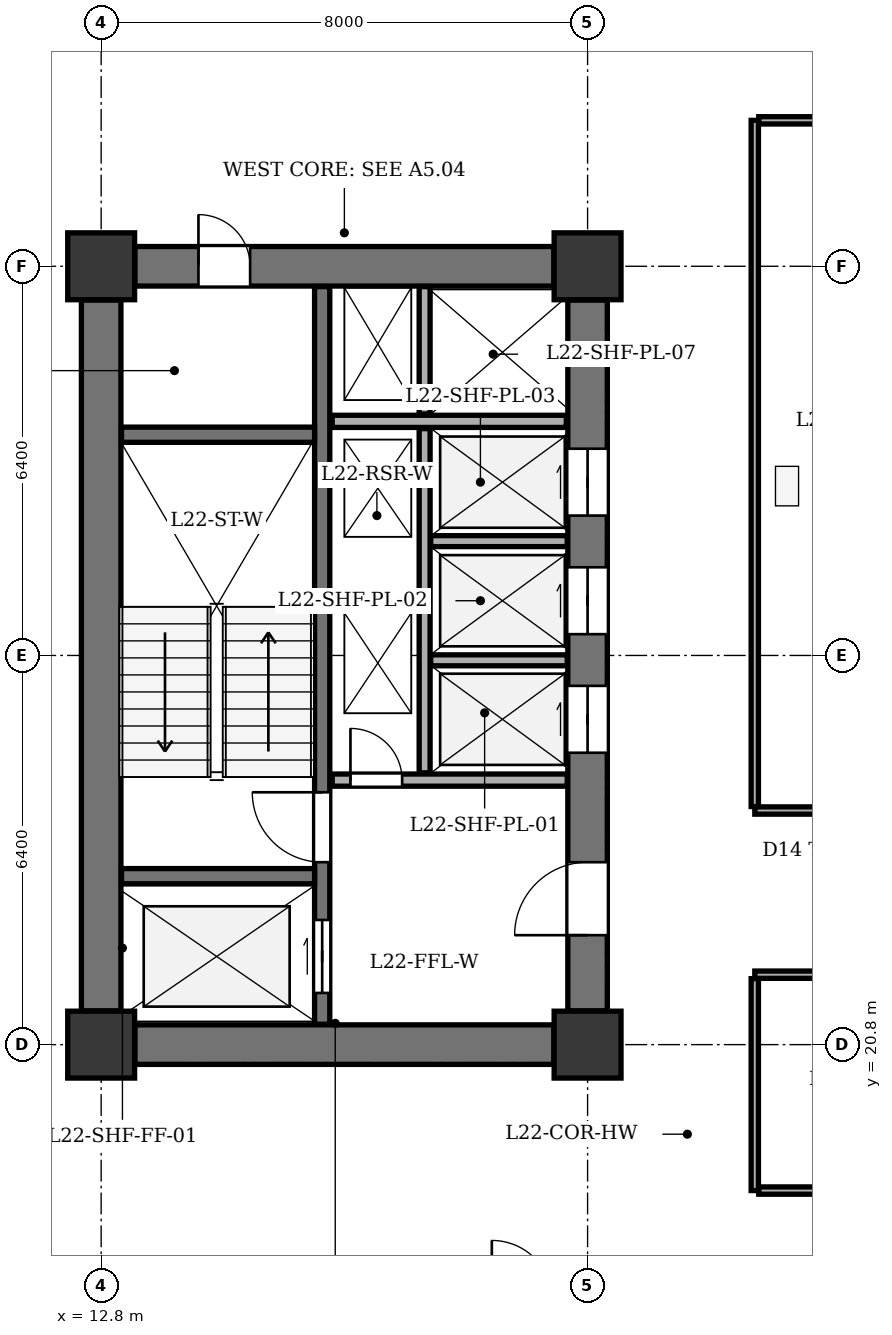
"""IFC4 building model, lengths in metres.
Left out: names, types, materials, properties, quantities, classifications, styles, units other than length and angle.
Written with IfcOpenShell. Run it as: python <this file> out.ifc"""

import sys

from ifc_helpers import new_model, si_unit, direction, frame, frame_2d, origin, origin_2d, place, context, subcontext, project, spatial, rectangle, extrude, element, fill, save


model = new_model("IFC4")
c1 = context("Model", 3, precision=1e-05, world=origin(), true_north=direction((0.0, 1.0)))
c2 = subcontext(c1, "Body", "Model", "MODEL_VIEW")
j1 = project(units=[si_unit("LENGTHUNIT", "METRE"), si_unit("PLANEANGLEUNIT", "RADIAN")], contexts=[c1])
p1 = place(None, origin())
s1 = spatial("IfcSite", under=j1, at=p1, CompositionType="ELEMENT")
p2 = place(p1, origin())
s2 = spatial("IfcBuilding", under=s1, at=p2, CompositionType="ELEMENT")
p3 = place(p2, frame((0.0, 0.0, 90.6)))
s3 = spatial("IfcBuildingStorey", under=s2, at=p3, CompositionType="ELEMENT", Elevation=90.6)
for number, where, z_axis, x_axis in (
    (1, (12.8, 20.8, 0.0), (0.0, 0.0, 1.0), (1.0, 0.0, 0.0)),
    (2, (20.8, 20.8, 0.0), (0.0, 0.0, 1.0), (1.0, 0.0, 0.0)),
    (3, (12.8, 33.6, 0.0), (0.0, 0.0, 1.0), (1.0, 0.0, 0.0)),
    (4, (20.8, 33.6, 0.0), (0.0, 0.0, 1.0), (1.0, 0.0, 0.0)),
):
    element("IfcColumn", number, at=place(p3, frame(where, z_axis=z_axis, x_axis=x_axis)), inside=s3, PredefinedType="COLUMN", context=c2, shape_type="SweptSolid", body=[
        extrude(rectangle(XDim=1.1, YDim=1.1, at=origin_2d()), origin(), (0.0, 0.0, 1.0), 3.9),
    ])
p4 = place(p3, frame((12.8, 21.355, 0.0), z_axis=(0.0, 0.0, 1.0), x_axis=(0.0, 1.0, 0.0)))
e5 = element("IfcWall", 5, at=p4, inside=s3, PredefinedType="SHEAR", context=c2, shape_type="SweptSolid", body=[
    extrude(rectangle(XDim=11.69, YDim=0.65, at=frame_2d((5.845, 0.0))), origin(), (0.0, 0.0, 1.0), 3.45),
])
p5 = place(p3, frame((13.355, 20.8, 0.0), z_axis=(0.0, 0.0, 1.0), x_axis=(1.0, 0.0, 0.0)))
e6 = element("IfcWall", 6, at=p5, inside=s3, PredefinedType="SHEAR", context=c2, shape_type="SweptSolid", body=[
    extrude(rectangle(XDim=6.89, YDim=0.65, at=frame_2d((3.445, 0.0))), origin(), (0.0, 0.0, 1.0), 3.45),
])
p6 = place(p3, frame((13.355, 33.6, 0.0), z_axis=(0.0, 0.0, 1.0), x_axis=(1.0, 0.0, 0.0)))
e7 = element("IfcWall", 7, at=p6, inside=s3, PredefinedType="SHEAR", context=c2, shape_type="SweptSolid", body=[
    extrude(rectangle(XDim=6.89, YDim=0.65, at=frame_2d((3.445, 0.0))), origin(), (0.0, 0.0, 1.0), 3.45),
])
p7 = place(p6, frame((1.045, 0.0, 0.0)))
e8 = element("IfcOpeningElement", 8, at=p7, cuts=e7, PredefinedType="OPENING", context=c2, shape_type="SweptSolid", body=[
    extrude(rectangle(XDim=0.85, YDim=2.02, at=frame_2d((0.425, 1.01))), frame((0.0, 0.335, 0.0), z_axis=(0.0, -1.0, 0.0), x_axis=(1.0, 0.0, 0.0)), (0.0, 0.0, 1.0), 0.67),
])
p8 = place(p3, frame((20.8, 21.355, 0.0), z_axis=(0.0, 0.0, 1.0), x_axis=(0.0, 1.0, 0.0)))
e9 = element("IfcWall", 9, at=p8, inside=s3, PredefinedType="SHEAR", context=c2, shape_type="SweptSolid", body=[
    extrude(rectangle(XDim=11.69, YDim=0.65, at=frame_2d((5.845, 0.0))), origin(), (0.0, 0.0, 1.0), 3.45),
])
p9 = place(p8, frame((1.245, 0.0, 0.0)))
e10 = element("IfcOpeningElement", 10, at=p9, cuts=e9, PredefinedType="OPENING", context=c2, shape_type="SweptSolid", body=[
    extrude(rectangle(XDim=1.2, YDim=2.15, at=frame_2d((0.6, 1.075))), frame((0.0, 0.335, 0.0), z_axis=(0.0, -1.0, 0.0), x_axis=(1.0, 0.0, 0.0)), (0.0, 0.0, 1.0), 0.67),
])
p10 = place(p8, frame((4.245, 0.0, 0.0)))
e11 = element("IfcOpeningElement", 11, at=p10, cuts=e9, PredefinedType="OPENING", context=c2, shape_type="SweptSolid", body=[
    extrude(rectangle(XDim=1.1, YDim=2.1, at=frame_2d((0.55, 1.05))), frame((0.0, 0.335, 0.0), z_axis=(0.0, -1.0, 0.0), x_axis=(1.0, 0.0, 0.0)), (0.0, 0.0, 1.0), 0.67),
])
p11 = place(p8, frame((6.195, 0.0, 0.0)))
e12 = element("IfcOpeningElement", 12, at=p11, cuts=e9, PredefinedType="OPENING", context=c2, shape_type="SweptSolid", body=[
    extrude(rectangle(XDim=1.1, YDim=2.1, at=frame_2d((0.55, 1.05))), frame((0.0, 0.335, 0.0), z_axis=(0.0, -1.0, 0.0), x_axis=(1.0, 0.0, 0.0)), (0.0, 0.0, 1.0), 0.67),
])
p12 = place(p8, frame((8.145, 0.0, 0.0)))
e13 = element("IfcOpeningElement", 13, at=p12, cuts=e9, PredefinedType="OPENING", context=c2, shape_type="SweptSolid", body=[
    extrude(rectangle(XDim=1.1, YDim=2.1, at=frame_2d((0.55, 1.05))), frame((0.0, 0.335, 0.0), z_axis=(0.0, -1.0, 0.0), x_axis=(1.0, 0.0, 0.0)), (0.0, 0.0, 1.0), 0.67),
])
p13 = place(p3, frame((16.435, 21.135, 0.0), z_axis=(0.0, 0.0, 1.0), x_axis=(0.0, 1.0, 0.0)))
e14 = element("IfcWall", 14, at=p13, inside=s3, PredefinedType="SHEAR", context=c2, shape_type="SweptSolid", body=[
    extrude(rectangle(XDim=12.13, YDim=0.25, at=frame_2d((6.065, 0.0))), origin(), (0.0, 0.0, 1.0), 3.45),
])
p14 = place(p13, frame((0.515, 0.0, 0.0)))
e15 = element("IfcOpeningElement", 15, at=p14, cuts=e14, PredefinedType="OPENING", context=c2, shape_type="SweptSolid", body=[
    extrude(rectangle(XDim=1.2, YDim=2.15, at=frame_2d((0.6, 1.075))), frame((0.0, 0.135, 0.0), z_axis=(0.0, -1.0, 0.0), x_axis=(1.0, 0.0, 0.0)), (0.0, 0.0, 1.0), 0.27),
])
p15 = place(p13, frame((2.665, 0.0, 0.0)))
e16 = element("IfcOpeningElement", 16, at=p15, cuts=e14, PredefinedType="OPENING", context=c2, shape_type="SweptSolid", body=[
    extrude(rectangle(XDim=1.15, YDim=2.15, at=frame_2d((0.575, 1.075))), frame((0.0, 0.135, 0.0), z_axis=(0.0, -1.0, 0.0), x_axis=(1.0, 0.0, 0.0)), (0.0, 0.0, 1.0), 0.27),
])
for number, where, z_axis, x_axis in (
    (17, (13.135, 23.57, 0.0), (0.0, 0.0, 1.0), (1.0, 0.0, 0.0)),
    (18, (13.135, 30.83, 0.0), (0.0, 0.0, 1.0), (1.0, 0.0, 0.0)),
):
    element("IfcWall", number, at=place(p3, frame(where, z_axis=z_axis, x_axis=x_axis)), inside=s3, PredefinedType="SHEAR", context=c2, shape_type="SweptSolid", body=[
        extrude(rectangle(XDim=3.175, YDim=0.25, at=frame_2d((1.587, 0.0))), origin(), (0.0, 0.0, 1.0), 3.45),
    ])
p16 = place(p3, frame((16.6, 25.15, 0.0), z_axis=(0.0, 0.0, 1.0), x_axis=(1.0, 0.0, 0.0)))
e19 = element("IfcWall", 19, at=p16, inside=s3, PredefinedType="SOLIDWALL", context=c2, shape_type="SweptSolid", body=[
    extrude(rectangle(XDim=3.865, YDim=0.2, at=frame_2d((1.933, 0.0))), origin(), (0.0, 0.0, 1.0), 3.45),
])
p17 = place(p16, frame((0.3, 0.0, 0.0)))
e20 = element("IfcOpeningElement", 20, at=p17, cuts=e19, PredefinedType="OPENING", context=c2, shape_type="SweptSolid", body=[
    extrude(rectangle(XDim=0.85, YDim=2.02, at=frame_2d((0.425, 1.01))), frame((0.0, 0.11, 0.0), z_axis=(0.0, -1.0, 0.0), x_axis=(1.0, 0.0, 0.0)), (0.0, 0.0, 1.0), 0.22),
])
p18 = place(p3, frame((16.6, 31.05, 0.0), z_axis=(0.0, 0.0, 1.0), x_axis=(1.0, 0.0, 0.0)))
e21 = element("IfcWall", 21, at=p18, inside=s3, PredefinedType="SOLIDWALL", context=c2, shape_type="SweptSolid", body=[
    extrude(rectangle(XDim=3.85, YDim=0.2, at=frame_2d((1.925, 0.0))), origin(), (0.0, 0.0, 1.0), 3.45),
])
p19 = place(p3, frame((18.12, 25.27, 0.0), z_axis=(0.0, 0.0, 1.0), x_axis=(0.0, 1.0, 0.0)))
e22 = element("IfcWall", 22, at=p19, inside=s3, PredefinedType="PARTITIONING", context=c2, shape_type="SweptSolid", body=[
    extrude(rectangle(XDim=5.66, YDim=0.18, at=frame_2d((2.83, 0.0))), origin(), (0.0, 0.0, 1.0), 3.45),
])
p20 = place(p3, frame((18.12, 31.17, 0.0), z_axis=(0.0, 0.0, 1.0), x_axis=(0.0, 1.0, 0.0)))
e23 = element("IfcWall", 23, at=p20, inside=s3, PredefinedType="PARTITIONING", context=c2, shape_type="SweptSolid", body=[
    extrude(rectangle(XDim=2.095, YDim=0.18, at=frame_2d((1.047, 0.0))), origin(), (0.0, 0.0, 1.0), 3.45),
])
for number, where, z_axis, x_axis in (
    (24, (18.22, 27.12, 0.0), (0.0, 0.0, 1.0), (1.0, 0.0, 0.0)),
    (25, (18.22, 29.08, 0.0), (0.0, 0.0, 1.0), (1.0, 0.0, 0.0)),
):
    element("IfcWall", number, at=place(p3, frame(where, z_axis=z_axis, x_axis=x_axis)), inside=s3, PredefinedType="PARTITIONING", context=c2, shape_type="SweptSolid", body=[
        extrude(rectangle(XDim=2.245, YDim=0.18, at=frame_2d((1.123, 0.0))), origin(), (0.0, 0.0, 1.0), 3.45),
    ])
p21 = place(p3, frame((23.55, 24.65, 0.0), z_axis=(0.0, 0.0, 1.0), x_axis=(1.0, 0.0, 0.0)))
e26 = element("IfcWall", 26, at=p21, inside=s3, PredefinedType="PARTITIONING", context=c2, shape_type="SweptSolid", body=[
    extrude(rectangle(XDim=8.9, YDim=0.12, at=frame_2d((4.45, 0.0))), origin(), (0.0, 0.0, 1.0), 2.885),
])
p22 = place(p21, frame((1.0, 0.0, 0.0)))
e27 = element("IfcOpeningElement", 27, at=p22, cuts=e26, PredefinedType="OPENING", context=c2, shape_type="SweptSolid", body=[
    extrude(rectangle(XDim=0.95, YDim=2.1, at=frame_2d((0.475, 1.05))), frame((0.0, 0.07, 0.0), z_axis=(0.0, -1.0, 0.0), x_axis=(1.0, 0.0, 0.0)), (0.0, 0.0, 1.0), 0.14),
])
p23 = place(p21, frame((4.1, 0.0, 0.0)))
e28 = element("IfcOpeningElement", 28, at=p23, cuts=e26, PredefinedType="OPENING", context=c2, shape_type="SweptSolid", body=[
    extrude(rectangle(XDim=0.95, YDim=2.1, at=frame_2d((0.475, 1.05))), frame((0.0, 0.07, 0.0), z_axis=(0.0, -1.0, 0.0), x_axis=(1.0, 0.0, 0.0)), (0.0, 0.0, 1.0), 0.14),
])
p24 = place(p21, frame((7.0, 0.0, 0.0)))
e29 = element("IfcOpeningElement", 29, at=p24, cuts=e26, PredefinedType="OPENING", context=c2, shape_type="SweptSolid", body=[
    extrude(rectangle(XDim=1.0, YDim=2.1, at=frame_2d((0.5, 1.05))), frame((0.0, 0.07, 0.0), z_axis=(0.0, -1.0, 0.0), x_axis=(1.0, 0.0, 0.0)), (0.0, 0.0, 1.0), 0.14),
])
p25 = place(p3, frame((23.55, 24.715, 0.0), z_axis=(0.0, 0.0, 1.0), x_axis=(0.0, 1.0, 0.0)))
e30 = element("IfcWall", 30, at=p25, inside=s3, PredefinedType="PARTITIONING", context=c2, shape_type="SweptSolid", body=[
    extrude(rectangle(XDim=11.285, YDim=0.12, at=frame_2d((5.643, 0.0))), origin(), (0.0, 0.0, 1.0), 3.45),
])
p26 = place(p3, frame((23.615, 36.0, 0.0), z_axis=(0.0, 0.0, 1.0), x_axis=(1.0, 0.0, 0.0)))
e31 = element("IfcWall", 31, at=p26, inside=s3, PredefinedType="PARTITIONING", context=c2, shape_type="SweptSolid", body=[
    extrude(rectangle(XDim=8.77, YDim=0.12, at=frame_2d((4.385, 0.0))), origin(), (0.0, 0.0, 1.0), 3.45),
])
p27 = place(p3, frame((23.55, 21.95, 0.0), z_axis=(0.0, 0.0, 1.0), x_axis=(1.0, 0.0, 0.0)))
e32 = element("IfcWall", 32, at=p27, inside=s3, PredefinedType="PARTITIONING", context=c2, shape_type="SweptSolid", body=[
    extrude(rectangle(XDim=8.9, YDim=0.12, at=frame_2d((4.45, 0.0))), origin(), (0.0, 0.0, 1.0), 2.885),
])
p28 = place(p27, frame((3.6, 0.0, 0.0)))
e33 = element("IfcOpeningElement", 33, at=p28, cuts=e32, PredefinedType="OPENING", context=c2, shape_type="SweptSolid", body=[
    extrude(rectangle(XDim=1.1, YDim=2.15, at=frame_2d((0.55, 1.075))), frame((0.0, 0.07, 0.0), z_axis=(0.0, -1.0, 0.0), x_axis=(1.0, 0.0, 0.0)), (0.0, 0.0, 1.0), 0.14),
])
p29 = place(p3, frame((23.55, 18.4, 0.0), z_axis=(0.0, 0.0, 1.0), x_axis=(0.0, 1.0, 0.0)))
e34 = element("IfcWall", 34, at=p29, inside=s3, PredefinedType="PARTITIONING", context=c2, shape_type="SweptSolid", body=[
    extrude(rectangle(XDim=3.485, YDim=0.12, at=frame_2d((1.743, 0.0))), origin(), (0.0, 0.0, 1.0), 3.45),
])
p30 = place(p3, frame((23.615, 18.4, 0.0), z_axis=(0.0, 0.0, 1.0), x_axis=(1.0, 0.0, 0.0)))
e35 = element("IfcWall", 35, at=p30, inside=s3, PredefinedType="PARTITIONING", context=c2, shape_type="SweptSolid", body=[
    extrude(rectangle(XDim=8.77, YDim=0.12, at=frame_2d((4.385, 0.0))), origin(), (0.0, 0.0, 1.0), 3.45),
])
p31 = place(p7, origin())
e36 = element("IfcDoor", 36, at=p31, inside=s3, OperationType="SINGLE_SWING_LEFT", PredefinedType="DOOR", context=c2, shape_type="SweptSolid", body=[
    extrude(rectangle(XDim=0.85, YDim=2.02, at=frame_2d((0.425, 1.01))), frame((0.0, 0.025, 0.0), z_axis=(0.0, -1.0, 0.0), x_axis=(1.0, 0.0, 0.0)), (0.0, 0.0, 1.0), 0.05),
])
fill(e8, e36)
p32 = place(p9, origin())
e37 = element("IfcDoor", 37, at=p32, inside=s3, OperationType="SINGLE_SWING_LEFT", PredefinedType="DOOR", context=c2, shape_type="SweptSolid", body=[
    extrude(rectangle(XDim=1.2, YDim=2.15, at=frame_2d((0.6, 1.075))), frame((0.0, 0.025, 0.0), z_axis=(0.0, -1.0, 0.0), x_axis=(1.0, 0.0, 0.0)), (0.0, 0.0, 1.0), 0.05),
])
fill(e10, e37)
p33 = place(p10, origin())
e38 = element("IfcDoor", 38, at=p33, inside=s3, OperationType="DOUBLE_DOOR_SLIDING", PredefinedType="DOOR", context=c2, shape_type="SweptSolid", body=[
    extrude(rectangle(XDim=1.1, YDim=2.1, at=frame_2d((0.55, 1.05))), frame((0.0, 0.025, 0.0), z_axis=(0.0, -1.0, 0.0), x_axis=(1.0, 0.0, 0.0)), (0.0, 0.0, 1.0), 0.05),
])
fill(e11, e38)
p34 = place(p11, origin())
e39 = element("IfcDoor", 39, at=p34, inside=s3, OperationType="DOUBLE_DOOR_SLIDING", PredefinedType="DOOR", context=c2, shape_type="SweptSolid", body=[
    extrude(rectangle(XDim=1.1, YDim=2.1, at=frame_2d((0.55, 1.05))), frame((0.0, 0.025, 0.0), z_axis=(0.0, -1.0, 0.0), x_axis=(1.0, 0.0, 0.0)), (0.0, 0.0, 1.0), 0.05),
])
fill(e12, e39)
p35 = place(p12, origin())
e40 = element("IfcDoor", 40, at=p35, inside=s3, OperationType="DOUBLE_DOOR_SLIDING", PredefinedType="DOOR", context=c2, shape_type="SweptSolid", body=[
    extrude(rectangle(XDim=1.1, YDim=2.1, at=frame_2d((0.55, 1.05))), frame((0.0, 0.025, 0.0), z_axis=(0.0, -1.0, 0.0), x_axis=(1.0, 0.0, 0.0)), (0.0, 0.0, 1.0), 0.05),
])
fill(e13, e40)
p36 = place(p14, origin())
e41 = element("IfcDoor", 41, at=p36, inside=s3, OperationType="DOUBLE_DOOR_SLIDING", PredefinedType="DOOR", context=c2, shape_type="SweptSolid", body=[
    extrude(rectangle(XDim=1.2, YDim=2.15, at=frame_2d((0.6, 1.075))), frame((0.0, 0.025, 0.0), z_axis=(0.0, -1.0, 0.0), x_axis=(1.0, 0.0, 0.0)), (0.0, 0.0, 1.0), 0.05),
])
fill(e15, e41)
p37 = place(p15, origin())
e42 = element("IfcDoor", 42, at=p37, inside=s3, OperationType="SINGLE_SWING_RIGHT", PredefinedType="DOOR", context=c2, shape_type="SweptSolid", body=[
    extrude(rectangle(XDim=1.15, YDim=2.15, at=frame_2d((0.575, 1.075))), frame((0.0, 0.025, 0.0), z_axis=(0.0, -1.0, 0.0), x_axis=(1.0, 0.0, 0.0)), (0.0, 0.0, 1.0), 0.05),
])
fill(e16, e42)
p38 = place(p17, origin())
e43 = element("IfcDoor", 43, at=p38, inside=s3, OperationType="SINGLE_SWING_LEFT", PredefinedType="DOOR", context=c2, shape_type="SweptSolid", body=[
    extrude(rectangle(XDim=0.85, YDim=2.02, at=frame_2d((0.425, 1.01))), frame((0.0, 0.025, 0.0), z_axis=(0.0, -1.0, 0.0), x_axis=(1.0, 0.0, 0.0)), (0.0, 0.0, 1.0), 0.05),
])
fill(e20, e43)
save(model, sys.argv[1])
